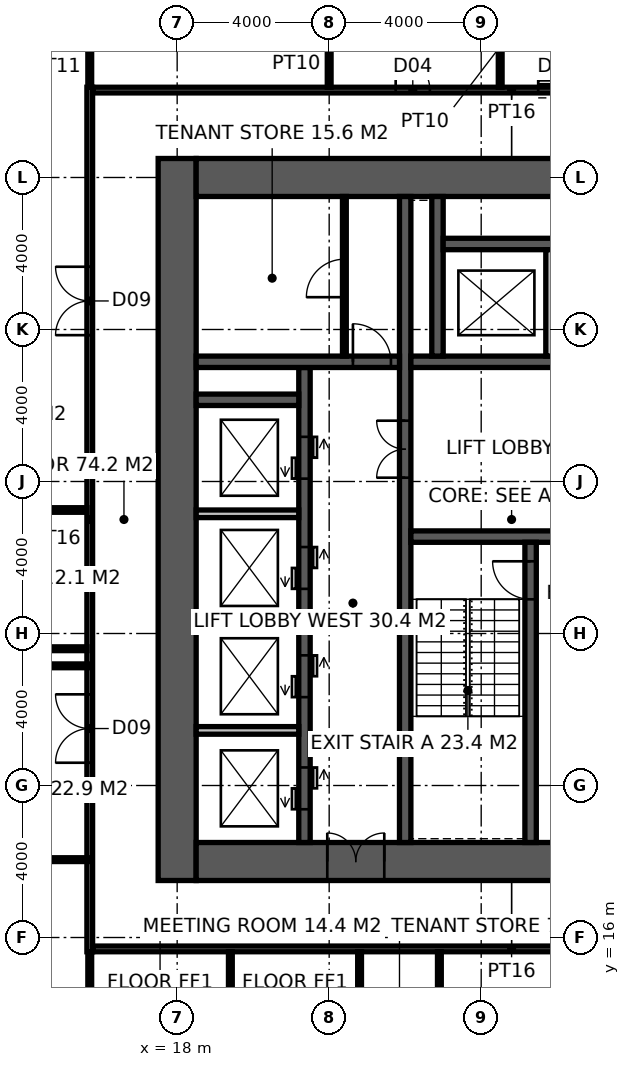
"""IFC4 building model, lengths in metres.
Left out: names, types, materials, properties, quantities, classifications, styles, units other than length and angle.
Written with IfcOpenShell. Run it as: python <this file> out.ifc"""

import sys

from ifc_helpers import new_model, si_unit, direction, frame, frame_2d, origin, place, context, subcontext, project, spatial, rectangle, extrude, element, fill, save


model = new_model("IFC4")
c1 = context("Model", 3, precision=1e-05, world=origin(), true_north=direction((0.0, 1.0)))
c2 = subcontext(c1, "Body", "Model", "MODEL_VIEW")
j1 = project(units=[si_unit("LENGTHUNIT", "METRE"), si_unit("PLANEANGLEUNIT", "RADIAN")], contexts=[c1])
p1 = place(None, origin())
s1 = spatial("IfcSite", under=j1, at=p1, CompositionType="ELEMENT")
p2 = place(p1, origin())
s2 = spatial("IfcBuilding", under=s1, at=p2, CompositionType="ELEMENT")
p3 = place(p2, frame((0.0, 0.0, 121.4)))
s3 = spatial("IfcBuildingStorey", under=s2, at=p3, CompositionType="ELEMENT", Elevation=121.4)
p4 = place(p3, frame((18.0, 17.5, -0.15), z_axis=(0.0, 0.0, 1.0), x_axis=(0.0, 1.0, 0.0)))
e1 = element("IfcWall", 1, at=p4, inside=s3, PredefinedType="SHEAR", context=c2, shape_type="SweptSolid", body=[
    extrude(rectangle(XDim=19.0, YDim=1.0, at=frame_2d((9.5, 0.0))), origin(), (0.0, 0.0, 1.0), 4.0),
])
p5 = place(p3, frame((18.5, 18.0, -0.15), z_axis=(0.0, 0.0, 1.0), x_axis=(1.0, 0.0, 0.0)))
e2 = element("IfcWall", 2, at=p5, inside=s3, PredefinedType="SHEAR", context=c2, shape_type="SweptSolid", body=[
    extrude(rectangle(XDim=17.6, YDim=1.0, at=frame_2d((8.8, 0.0))), origin(), (0.0, 0.0, 1.0), 4.0),
])
p6 = place(p5, frame((3.45, 0.0, 0.15)))
e3 = element("IfcOpeningElement", 3, at=p6, cuts=e2, PredefinedType="OPENING", context=c2, shape_type="SweptSolid", body=[
    extrude(rectangle(XDim=1.5, YDim=2.4, at=frame_2d((0.75, 1.2))), frame((0.0, 0.51, 0.0), z_axis=(0.0, -1.0, 0.0), x_axis=(1.0, 0.0, 0.0)), (0.0, 0.0, 1.0), 1.02),
])
p7 = place(p3, frame((18.5, 36.0, -0.15), z_axis=(0.0, 0.0, 1.0), x_axis=(1.0, 0.0, 0.0)))
e4 = element("IfcWall", 4, at=p7, inside=s3, PredefinedType="SHEAR", context=c2, shape_type="SweptSolid", body=[
    extrude(rectangle(XDim=17.6, YDim=1.0, at=frame_2d((8.8, 0.0))), origin(), (0.0, 0.0, 1.0), 4.0),
])
p8 = place(p3, frame((24.0, 18.5, -0.15), z_axis=(0.0, 0.0, 1.0), x_axis=(0.0, 1.0, 0.0)))
e5 = element("IfcWall", 5, at=p8, inside=s3, PredefinedType="SHEAR", context=c2, shape_type="SweptSolid", body=[
    extrude(rectangle(XDim=17.0, YDim=0.3, at=frame_2d((8.5, 0.0))), origin(), (0.0, 0.0, 1.0), 4.0),
])
p9 = place(p8, frame((9.6, 0.0, 0.15)))
e6 = element("IfcOpeningElement", 6, at=p9, cuts=e5, PredefinedType="OPENING", context=c2, shape_type="SweptSolid", body=[
    extrude(rectangle(XDim=1.5, YDim=2.4, at=frame_2d((0.75, 1.2))), frame((0.0, 0.16, 0.0), z_axis=(0.0, -1.0, 0.0), x_axis=(1.0, 0.0, 0.0)), (0.0, 0.0, 1.0), 0.32),
])
p10 = place(p3, frame((24.15, 26.55, -0.15), z_axis=(0.0, 0.0, 1.0), x_axis=(1.0, 0.0, 0.0)))
e7 = element("IfcWall", 7, at=p10, inside=s3, PredefinedType="SHEAR", context=c2, shape_type="SweptSolid", body=[
    extrude(rectangle(XDim=11.25, YDim=0.3, at=frame_2d((5.625, 0.0))), origin(), (0.0, 0.0, 1.0), 4.0),
])
p11 = place(p10, frame((9.25, 0.0, 0.15)))
e8 = element("IfcOpeningElement", 8, at=p11, cuts=e7, PredefinedType="OPENING", context=c2, shape_type="SweptSolid", body=[
    extrude(rectangle(XDim=1.0, YDim=2.2, at=frame_2d((0.5, 1.1))), frame((0.0, 0.16, 0.0), z_axis=(0.0, -1.0, 0.0), x_axis=(1.0, 0.0, 0.0)), (0.0, 0.0, 1.0), 0.32),
])
p12 = place(p10, frame((4.9, 0.0, 0.15)))
e9 = element("IfcOpeningElement", 9, at=p12, cuts=e7, PredefinedType="OPENING", context=c2, shape_type="SweptSolid", body=[
    extrude(rectangle(XDim=1.5, YDim=2.4, at=frame_2d((0.75, 1.2))), frame((0.0, 0.16, 0.0), z_axis=(0.0, -1.0, 0.0), x_axis=(1.0, 0.0, 0.0)), (0.0, 0.0, 1.0), 0.32),
])
p13 = place(p3, frame((27.3, 18.5, -0.15), z_axis=(0.0, 0.0, 1.0), x_axis=(0.0, 1.0, 0.0)))
e10 = element("IfcWall", 10, at=p13, inside=s3, PredefinedType="SHEAR", context=c2, shape_type="SweptSolid", body=[
    extrude(rectangle(XDim=7.9, YDim=0.3, at=frame_2d((3.95, 0.0))), origin(), (0.0, 0.0, 1.0), 4.0),
])
p14 = place(p13, frame((6.4, 0.0, 0.15)))
e11 = element("IfcOpeningElement", 11, at=p14, cuts=e10, PredefinedType="OPENING", context=c2, shape_type="SweptSolid", body=[
    extrude(rectangle(XDim=1.0, YDim=2.2, at=frame_2d((0.5, 1.1))), frame((0.0, 0.16, 0.0), z_axis=(0.0, -1.0, 0.0), x_axis=(1.0, 0.0, 0.0)), (0.0, 0.0, 1.0), 0.32),
])
p15 = place(p3, frame((24.15, 31.15, -0.15), z_axis=(0.0, 0.0, 1.0), x_axis=(1.0, 0.0, 0.0)))
e12 = element("IfcWall", 12, at=p15, inside=s3, PredefinedType="SHEAR", context=c2, shape_type="SweptSolid", body=[
    extrude(rectangle(XDim=11.25, YDim=0.3, at=frame_2d((5.625, 0.0))), origin(), (0.0, 0.0, 1.0), 4.0),
])
p16 = place(p15, frame((7.25, 0.0, 0.15)))
e13 = element("IfcOpeningElement", 13, at=p16, cuts=e12, PredefinedType="OPENING", context=c2, shape_type="SweptSolid", body=[
    extrude(rectangle(XDim=1.4, YDim=2.4, at=frame_2d((0.7, 1.2))), frame((0.0, 0.16, 0.0), z_axis=(0.0, -1.0, 0.0), x_axis=(1.0, 0.0, 0.0)), (0.0, 0.0, 1.0), 0.32),
])
p17 = place(p3, frame((21.35, 18.5, -0.15), z_axis=(0.0, 0.0, 1.0), x_axis=(0.0, 1.0, 0.0)))
e14 = element("IfcWall", 14, at=p17, inside=s3, PredefinedType="SHEAR", context=c2, shape_type="SweptSolid", body=[
    extrude(rectangle(XDim=12.5, YDim=0.3, at=frame_2d((6.25, 0.0))), origin(), (0.0, 0.0, 1.0), 4.0),
])
p18 = place(p17, frame((0.875, 0.0, 0.15)))
e15 = element("IfcOpeningElement", 15, at=p18, cuts=e14, PredefinedType="OPENING", context=c2, shape_type="SweptSolid", body=[
    extrude(rectangle(XDim=1.1, YDim=2.2, at=frame_2d((0.55, 1.1))), frame((0.0, 0.16, 0.0), z_axis=(0.0, -1.0, 0.0), x_axis=(1.0, 0.0, 0.0)), (0.0, 0.0, 1.0), 0.32),
])
p19 = place(p17, frame((3.825, 0.0, 0.15)))
e16 = element("IfcOpeningElement", 16, at=p19, cuts=e14, PredefinedType="OPENING", context=c2, shape_type="SweptSolid", body=[
    extrude(rectangle(XDim=1.1, YDim=2.2, at=frame_2d((0.55, 1.1))), frame((0.0, 0.16, 0.0), z_axis=(0.0, -1.0, 0.0), x_axis=(1.0, 0.0, 0.0)), (0.0, 0.0, 1.0), 0.32),
])
p20 = place(p17, frame((6.675, 0.0, 0.15)))
e17 = element("IfcOpeningElement", 17, at=p20, cuts=e14, PredefinedType="OPENING", context=c2, shape_type="SweptSolid", body=[
    extrude(rectangle(XDim=1.1, YDim=2.2, at=frame_2d((0.55, 1.1))), frame((0.0, 0.16, 0.0), z_axis=(0.0, -1.0, 0.0), x_axis=(1.0, 0.0, 0.0)), (0.0, 0.0, 1.0), 0.32),
])
p21 = place(p17, frame((9.575, 0.0, 0.15)))
e18 = element("IfcOpeningElement", 18, at=p21, cuts=e14, PredefinedType="OPENING", context=c2, shape_type="SweptSolid", body=[
    extrude(rectangle(XDim=1.1, YDim=2.2, at=frame_2d((0.55, 1.1))), frame((0.0, 0.16, 0.0), z_axis=(0.0, -1.0, 0.0), x_axis=(1.0, 0.0, 0.0)), (0.0, 0.0, 1.0), 0.32),
])
p22 = place(p3, frame((18.5, 31.15, -0.15), z_axis=(0.0, 0.0, 1.0), x_axis=(1.0, 0.0, 0.0)))
e19 = element("IfcWall", 19, at=p22, inside=s3, PredefinedType="SHEAR", context=c2, shape_type="SweptSolid", body=[
    extrude(rectangle(XDim=5.35, YDim=0.3, at=frame_2d((2.675, 0.0))), origin(), (0.0, 0.0, 1.0), 4.0),
])
p23 = place(p22, frame((4.125, 0.0, 0.15)))
e20 = element("IfcOpeningElement", 20, at=p23, cuts=e19, PredefinedType="OPENING", context=c2, shape_type="SweptSolid", body=[
    extrude(rectangle(XDim=1.0, YDim=2.2, at=frame_2d((0.5, 1.1))), frame((0.0, 0.16, 0.0), z_axis=(0.0, -1.0, 0.0), x_axis=(1.0, 0.0, 0.0)), (0.0, 0.0, 1.0), 0.32),
])
p24 = place(p3, frame((18.5, 30.15, -0.15), z_axis=(0.0, 0.0, 1.0), x_axis=(1.0, 0.0, 0.0)))
e21 = element("IfcWall", 21, at=p24, inside=s3, PredefinedType="SHEAR", context=c2, shape_type="SweptSolid", body=[
    extrude(rectangle(XDim=2.7, YDim=0.3, at=frame_2d((1.35, 0.0))), origin(), (0.0, 0.0, 1.0), 4.0),
])
p25 = place(p3, frame((24.85, 31.3, -0.15), z_axis=(0.0, 0.0, 1.0), x_axis=(0.0, 1.0, 0.0)))
e22 = element("IfcWall", 22, at=p25, inside=s3, PredefinedType="SHEAR", context=c2, shape_type="SweptSolid", body=[
    extrude(rectangle(XDim=4.2, YDim=0.3, at=frame_2d((2.1, 0.0))), origin(), (0.0, 0.0, 1.0), 4.0),
])
p26 = place(p3, frame((25.0, 34.25, -0.15), z_axis=(0.0, 0.0, 1.0), x_axis=(1.0, 0.0, 0.0)))
e23 = element("IfcWall", 23, at=p26, inside=s3, PredefinedType="SHEAR", context=c2, shape_type="SweptSolid", body=[
    extrude(rectangle(XDim=8.6, YDim=0.3, at=frame_2d((4.3, 0.0))), origin(), (0.0, 0.0, 1.0), 4.0),
])
p27 = place(p3, frame((27.8, 31.3, -0.15), z_axis=(0.0, 0.0, 1.0), x_axis=(0.0, 1.0, 0.0)))
e24 = element("IfcWall", 24, at=p27, inside=s3, PredefinedType="SOLIDWALL", context=c2, shape_type="SweptSolid", body=[
    extrude(rectangle(XDim=2.8, YDim=0.2, at=frame_2d((1.4, 0.0))), origin(), (0.0, 0.0, 1.0), 4.0),
])
for number, where, z_axis, x_axis in (
    (25, (18.5, 21.45, -0.15), (0.0, 0.0, 1.0), (1.0, 0.0, 0.0)),
    (26, (18.5, 24.3, -0.15), (0.0, 0.0, 1.0), (1.0, 0.0, 0.0)),
    (27, (18.5, 27.15, -0.15), (0.0, 0.0, 1.0), (1.0, 0.0, 0.0)),
):
    element("IfcWall", number, at=place(p3, frame(where, z_axis=z_axis, x_axis=x_axis)), inside=s3, PredefinedType="SOLIDWALL", context=c2, shape_type="SweptSolid", body=[
        extrude(rectangle(XDim=2.7, YDim=0.2, at=frame_2d((1.35, 0.0))), origin(), (0.0, 0.0, 1.0), 4.0),
    ])
p28 = place(p3, frame((22.4, 31.3, 0.0), z_axis=(0.0, 0.0, 1.0), x_axis=(0.0, 1.0, 0.0)))
e28 = element("IfcWall", 28, at=p28, inside=s3, PredefinedType="PARTITIONING", context=c2, shape_type="SweptSolid", body=[
    extrude(rectangle(XDim=4.2, YDim=0.1, at=frame_2d((2.1, 0.0))), origin(), (0.0, 0.0, 1.0), 3.85),
])
p29 = place(p28, frame((1.55, 0.0, 0.0)))
e29 = element("IfcOpeningElement", 29, at=p29, cuts=e28, PredefinedType="OPENING", context=c2, shape_type="SweptSolid", body=[
    extrude(rectangle(XDim=1.0, YDim=2.2, at=frame_2d((0.5, 1.1))), frame((0.0, 0.06, 0.0), z_axis=(0.0, -1.0, 0.0), x_axis=(1.0, 0.0, 0.0)), (0.0, 0.0, 1.0), 0.12),
])
p30 = place(p3, frame((15.7, 15.625, 0.0), z_axis=(0.0, 0.0, 1.0), x_axis=(0.0, 1.0, 0.0)))
e30 = element("IfcWall", 30, at=p30, inside=s3, PredefinedType="PARTITIONING", context=c2, shape_type="SweptSolid", body=[
    extrude(rectangle(XDim=22.75, YDim=0.15, at=frame_2d((11.375, 0.0))), origin(), (0.0, 0.0, 1.0), 3.85),
])
p31 = place(p30, frame((4.974, 0.0, 0.0)))
e31 = element("IfcOpeningElement", 31, at=p31, cuts=e30, PredefinedType="OPENING", context=c2, shape_type="SweptSolid", body=[
    extrude(rectangle(XDim=1.8, YDim=2.4, at=frame_2d((0.9, 1.2))), frame((0.0, 0.085, 0.0), z_axis=(0.0, -1.0, 0.0), x_axis=(1.0, 0.0, 0.0)), (0.0, 0.0, 1.0), 0.17),
])
p32 = place(p30, frame((16.226, 0.0, 0.0)))
e32 = element("IfcOpeningElement", 32, at=p32, cuts=e30, PredefinedType="OPENING", context=c2, shape_type="SweptSolid", body=[
    extrude(rectangle(XDim=1.8, YDim=2.4, at=frame_2d((0.9, 1.2))), frame((0.0, 0.085, 0.0), z_axis=(0.0, -1.0, 0.0), x_axis=(1.0, 0.0, 0.0)), (0.0, 0.0, 1.0), 0.17),
])
p33 = place(p3, frame((15.775, 15.7, 0.0), z_axis=(0.0, 0.0, 1.0), x_axis=(1.0, 0.0, 0.0)))
e33 = element("IfcWall", 33, at=p33, inside=s3, PredefinedType="PARTITIONING", context=c2, shape_type="SweptSolid", body=[
    extrude(rectangle(XDim=22.05, YDim=0.15, at=frame_2d((11.025, 0.0))), origin(), (0.0, 0.0, 1.0), 3.85),
])
p34 = place(p3, frame((15.775, 38.3, 0.0), z_axis=(0.0, 0.0, 1.0), x_axis=(1.0, 0.0, 0.0)))
e34 = element("IfcWall", 34, at=p34, inside=s3, PredefinedType="PARTITIONING", context=c2, shape_type="SweptSolid", body=[
    extrude(rectangle(XDim=22.05, YDim=0.15, at=frame_2d((11.025, 0.0))), origin(), (0.0, 0.0, 1.0), 3.85),
])
p35 = place(p34, frame((7.975, 0.0, 0.0)))
e35 = element("IfcOpeningElement", 35, at=p35, cuts=e34, PredefinedType="OPENING", context=c2, shape_type="SweptSolid", body=[
    extrude(rectangle(XDim=0.9, YDim=2.1, at=frame_2d((0.45, 1.05))), frame((0.0, 0.085, 0.0), z_axis=(0.0, -1.0, 0.0), x_axis=(1.0, 0.0, 0.0)), (0.0, 0.0, 1.0), 0.17),
])
p36 = place(p34, frame((11.725, 0.0, 0.0)))
e36 = element("IfcOpeningElement", 36, at=p36, cuts=e34, PredefinedType="OPENING", context=c2, shape_type="SweptSolid", body=[
    extrude(rectangle(XDim=1.0, YDim=2.1, at=frame_2d((0.5, 1.05))), frame((0.0, 0.085, 0.0), z_axis=(0.0, -1.0, 0.0), x_axis=(1.0, 0.0, 0.0)), (0.0, 0.0, 1.0), 0.17),
])
p37 = place(p34, frame((15.575, 0.0, 0.0)))
e37 = element("IfcOpeningElement", 37, at=p37, cuts=e34, PredefinedType="OPENING", context=c2, shape_type="SweptSolid", body=[
    extrude(rectangle(XDim=0.9, YDim=2.1, at=frame_2d((0.45, 1.05))), frame((0.0, 0.085, 0.0), z_axis=(0.0, -1.0, 0.0), x_axis=(1.0, 0.0, 0.0)), (0.0, 0.0, 1.0), 0.17),
])
p38 = place(p3, frame((22.0, 38.375, 0.0), z_axis=(0.0, 0.0, 1.0), x_axis=(0.0, 1.0, 0.0)))
e38 = element("IfcWall", 38, at=p38, inside=s3, PredefinedType="PARTITIONING", context=c2, shape_type="SweptSolid", body=[
    extrude(rectangle(XDim=3.675, YDim=0.1, at=frame_2d((1.837, 0.0))), origin(), (0.0, 0.0, 1.0), 2.95),
])
p39 = place(p3, frame((26.5, 38.375, 0.0), z_axis=(0.0, 0.0, 1.0), x_axis=(0.0, 1.0, 0.0)))
e39 = element("IfcWall", 39, at=p39, inside=s3, PredefinedType="PARTITIONING", context=c2, shape_type="SweptSolid", body=[
    extrude(rectangle(XDim=3.575, YDim=0.1, at=frame_2d((1.788, 0.0))), origin(), (0.0, 0.0, 1.0), 3.85),
])
p40 = place(p3, frame((10.3, 27.25, 0.0), z_axis=(0.0, 0.0, 1.0), x_axis=(1.0, 0.0, 0.0)))
e40 = element("IfcWall", 40, at=p40, inside=s3, PredefinedType="PARTITIONING", context=c2, shape_type="SweptSolid", body=[
    extrude(rectangle(XDim=5.325, YDim=0.12, at=frame_2d((2.663, 0.0))), origin(), (0.0, 0.0, 1.0), 3.85),
])
p41 = place(p3, frame((12.05, 23.599, 0.0), z_axis=(0.0, 0.0, 1.0), x_axis=(1.0, 0.0, 0.0)))
e41 = element("IfcWall", 41, at=p41, inside=s3, PredefinedType="PARTITIONING", context=c2, shape_type="SweptSolid", body=[
    extrude(rectangle(XDim=3.575, YDim=0.1, at=frame_2d((1.788, 0.0))), origin(), (0.0, 0.0, 1.0), 2.95),
])
p42 = place(p3, frame((15.7, 11.55, 0.0), z_axis=(0.0, 0.0, 1.0), x_axis=(0.0, 1.0, 0.0)))
e42 = element("IfcWall", 42, at=p42, inside=s3, PredefinedType="PARTITIONING", context=c2, shape_type="SweptSolid", body=[
    extrude(rectangle(XDim=4.075, YDim=0.1, at=frame_2d((2.038, 0.0))), origin(), (0.0, 0.0, 1.0), 3.85),
])
p43 = place(p3, frame((15.7, 38.375, 0.0), z_axis=(0.0, 0.0, 1.0), x_axis=(0.0, 1.0, 0.0)))
e43 = element("IfcWall", 43, at=p43, inside=s3, PredefinedType="PARTITIONING", context=c2, shape_type="SweptSolid", body=[
    extrude(rectangle(XDim=3.475, YDim=0.1, at=frame_2d((1.738, 0.0))), origin(), (0.0, 0.0, 1.0), 3.85),
])
for number, where, z_axis, x_axis in (
    (44, (19.4, 11.55, 0.0), (0.0, 0.0, 1.0), (0.0, 1.0, 0.0)),
    (45, (22.8, 11.55, 0.0), (0.0, 0.0, 1.0), (0.0, 1.0, 0.0)),
    (46, (24.9, 11.55, 0.0), (0.0, 0.0, 1.0), (0.0, 1.0, 0.0)),
):
    element("IfcWall", number, at=place(p3, frame(where, z_axis=z_axis, x_axis=x_axis)), inside=s3, PredefinedType="PARTITIONING", context=c2, shape_type="SweptSolid", body=[
        extrude(rectangle(XDim=4.075, YDim=0.1, at=frame_2d((2.038, 0.0))), origin(), (0.0, 0.0, 1.0), 3.85),
    ])
for number, where, z_axis, x_axis in (
    (47, (15.7, 23.149, 0.0), (0.0, 0.0, 1.0), (-1.0, 0.0, 0.0)),
    (48, (11.2, 18.049, 0.0), (0.0, 0.0, 1.0), (1.0, 0.0, 0.0)),
):
    element("IfcWall", number, at=place(p3, frame(where, z_axis=z_axis, x_axis=x_axis)), inside=s3, PredefinedType="PARTITIONING", context=c2, shape_type="SweptSolid", body=[
        extrude(rectangle(XDim=4.5, YDim=0.1, at=frame_2d((2.25, 0.0))), origin(), (0.0, 0.0, 1.0), 3.85),
    ])
p44 = place(p14, origin())
e49 = element("IfcDoor", 49, at=p44, inside=s3, OperationType="SINGLE_SWING_RIGHT", PredefinedType="DOOR", context=c2, shape_type="SweptSolid", body=[
    extrude(rectangle(XDim=1.0, YDim=2.2, at=frame_2d((0.5, 1.1))), frame((0.0, 0.025, 0.0), z_axis=(0.0, -1.0, 0.0), x_axis=(1.0, 0.0, 0.0)), (0.0, 0.0, 1.0), 0.05),
])
fill(e11, e49)
p45 = place(p9, origin())
e50 = element("IfcDoor", 50, at=p45, inside=s3, OperationType="DOUBLE_DOOR_DOUBLE_SWING", PredefinedType="DOOR", context=c2, shape_type="SweptSolid", body=[
    extrude(rectangle(XDim=1.5, YDim=2.4, at=frame_2d((0.75, 1.2))), frame((0.0, 0.025, 0.0), z_axis=(0.0, -1.0, 0.0), x_axis=(1.0, 0.0, 0.0)), (0.0, 0.0, 1.0), 0.05),
])
fill(e6, e50)
p46 = place(p23, origin())
e51 = element("IfcDoor", 51, at=p46, inside=s3, OperationType="SINGLE_SWING_LEFT", PredefinedType="DOOR", context=c2, shape_type="SweptSolid", body=[
    extrude(rectangle(XDim=1.0, YDim=2.2, at=frame_2d((0.5, 1.1))), frame((0.0, 0.025, 0.0), z_axis=(0.0, -1.0, 0.0), x_axis=(1.0, 0.0, 0.0)), (0.0, 0.0, 1.0), 0.05),
])
fill(e20, e51)
p47 = place(p29, origin())
e52 = element("IfcDoor", 52, at=p47, inside=s3, OperationType="SINGLE_SWING_LEFT", PredefinedType="DOOR", context=c2, shape_type="SweptSolid", body=[
    extrude(rectangle(XDim=1.0, YDim=2.2, at=frame_2d((0.5, 1.1))), frame((0.0, 0.025, 0.0), z_axis=(0.0, -1.0, 0.0), x_axis=(1.0, 0.0, 0.0)), (0.0, 0.0, 1.0), 0.05),
])
fill(e29, e52)
p48 = place(p6, origin())
e53 = element("IfcDoor", 53, at=p48, inside=s3, OperationType="DOUBLE_DOOR_DOUBLE_SWING", PredefinedType="DOOR", context=c2, shape_type="SweptSolid", body=[
    extrude(rectangle(XDim=1.5, YDim=2.4, at=frame_2d((0.75, 1.2))), frame((0.0, 0.025, 0.0), z_axis=(0.0, -1.0, 0.0), x_axis=(1.0, 0.0, 0.0)), (0.0, 0.0, 1.0), 0.05),
])
fill(e3, e53)
p49 = place(p35, origin())
e54 = element("IfcDoor", 54, at=p49, inside=s3, OperationType="SINGLE_SWING_LEFT", PredefinedType="DOOR", context=c2, shape_type="SweptSolid", body=[
    extrude(rectangle(XDim=0.9, YDim=2.1, at=frame_2d((0.45, 1.05))), frame((0.0, 0.025, 0.0), z_axis=(0.0, -1.0, 0.0), x_axis=(1.0, 0.0, 0.0)), (0.0, 0.0, 1.0), 0.05),
])
fill(e35, e54)
p50 = place(p36, origin())
e55 = element("IfcDoor", 55, at=p50, inside=s3, OperationType="SLIDING_TO_LEFT", PredefinedType="DOOR", context=c2, shape_type="SweptSolid", body=[
    extrude(rectangle(XDim=1.0, YDim=2.1, at=frame_2d((0.5, 1.05))), frame((0.0, 0.025, 0.0), z_axis=(0.0, -1.0, 0.0), x_axis=(1.0, 0.0, 0.0)), (0.0, 0.0, 1.0), 0.05),
])
fill(e36, e55)
p51 = place(p31, origin())
e56 = element("IfcDoor", 56, at=p51, inside=s3, OperationType="DOUBLE_DOOR_DOUBLE_SWING", PredefinedType="DOOR", context=c2, shape_type="SweptSolid", body=[
    extrude(rectangle(XDim=1.8, YDim=2.4, at=frame_2d((0.9, 1.2))), frame((0.0, 0.025, 0.0), z_axis=(0.0, -1.0, 0.0), x_axis=(1.0, 0.0, 0.0)), (0.0, 0.0, 1.0), 0.05),
])
fill(e31, e56)
p52 = place(p32, origin())
e57 = element("IfcDoor", 57, at=p52, inside=s3, OperationType="DOUBLE_DOOR_DOUBLE_SWING", PredefinedType="DOOR", context=c2, shape_type="SweptSolid", body=[
    extrude(rectangle(XDim=1.8, YDim=2.4, at=frame_2d((0.9, 1.2))), frame((0.0, 0.025, 0.0), z_axis=(0.0, -1.0, 0.0), x_axis=(1.0, 0.0, 0.0)), (0.0, 0.0, 1.0), 0.05),
])
fill(e32, e57)
p53 = place(p18, origin())
e58 = element("IfcDoor", 58, at=p53, inside=s3, OperationType="DOUBLE_DOOR_SLIDING", PredefinedType="DOOR", context=c2, shape_type="SweptSolid", body=[
    extrude(rectangle(XDim=1.1, YDim=2.2, at=frame_2d((0.55, 1.1))), frame((0.0, 0.025, 0.0), z_axis=(0.0, -1.0, 0.0), x_axis=(1.0, 0.0, 0.0)), (0.0, 0.0, 1.0), 0.05),
])
fill(e15, e58)
p54 = place(p19, origin())
e59 = element("IfcDoor", 59, at=p54, inside=s3, OperationType="DOUBLE_DOOR_SLIDING", PredefinedType="DOOR", context=c2, shape_type="SweptSolid", body=[
    extrude(rectangle(XDim=1.1, YDim=2.2, at=frame_2d((0.55, 1.1))), frame((0.0, 0.025, 0.0), z_axis=(0.0, -1.0, 0.0), x_axis=(1.0, 0.0, 0.0)), (0.0, 0.0, 1.0), 0.05),
])
fill(e16, e59)
p55 = place(p20, origin())
e60 = element("IfcDoor", 60, at=p55, inside=s3, OperationType="DOUBLE_DOOR_SLIDING", PredefinedType="DOOR", context=c2, shape_type="SweptSolid", body=[
    extrude(rectangle(XDim=1.1, YDim=2.2, at=frame_2d((0.55, 1.1))), frame((0.0, 0.025, 0.0), z_axis=(0.0, -1.0, 0.0), x_axis=(1.0, 0.0, 0.0)), (0.0, 0.0, 1.0), 0.05),
])
fill(e17, e60)
p56 = place(p21, origin())
e61 = element("IfcDoor", 61, at=p56, inside=s3, OperationType="DOUBLE_DOOR_SLIDING", PredefinedType="DOOR", context=c2, shape_type="SweptSolid", body=[
    extrude(rectangle(XDim=1.1, YDim=2.2, at=frame_2d((0.55, 1.1))), frame((0.0, 0.025, 0.0), z_axis=(0.0, -1.0, 0.0), x_axis=(1.0, 0.0, 0.0)), (0.0, 0.0, 1.0), 0.05),
])
fill(e18, e61)
save(model, sys.argv[1])
